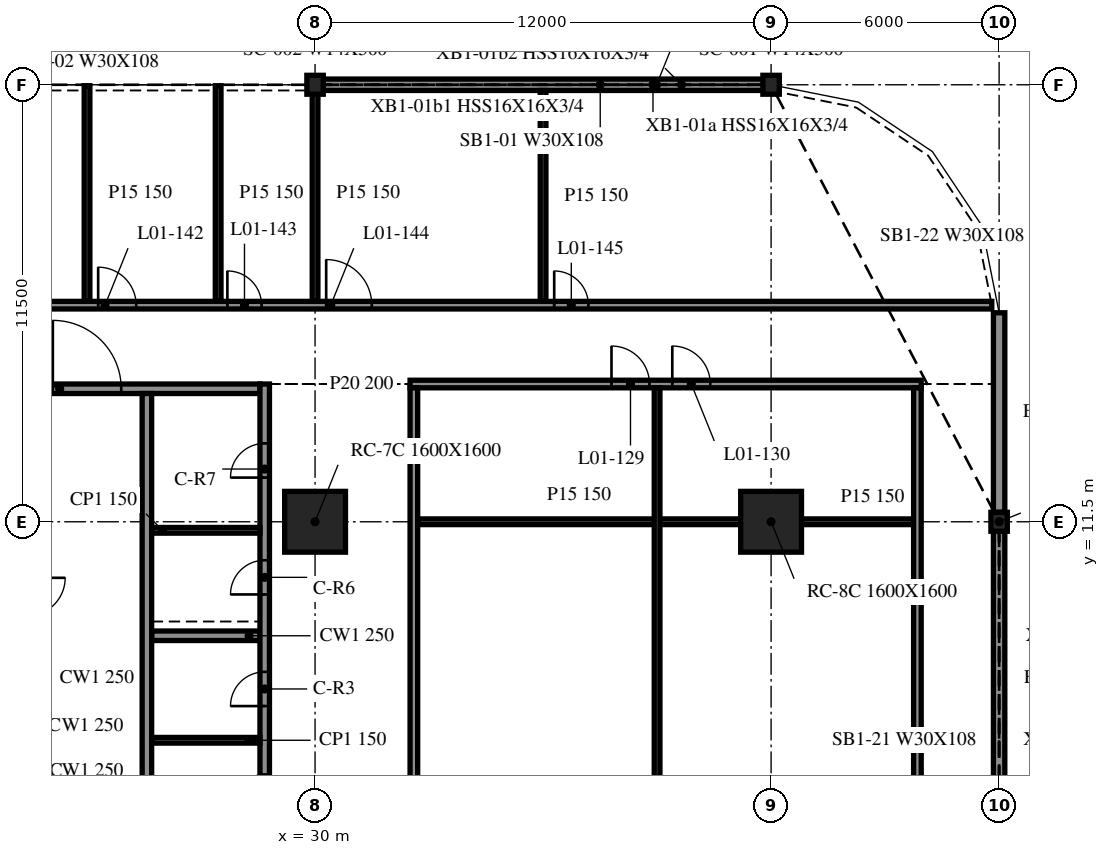
"""IFC4 building model, lengths in metres.
Left out: names, types, materials, properties, quantities, classifications, styles, units other than length and angle.
Written with IfcOpenShell. Run it as: python <this file> out.ifc"""

import sys

from ifc_helpers import new_model, si_unit, direction, frame, frame_2d, origin, origin_2d, place, context, subcontext, project, spatial, rectangle, i_section, extrude, element, fill, save


model = new_model("IFC4")
c1 = context("Model", 3, precision=1e-05, world=origin(), true_north=direction((0.0, 1.0)))
c2 = subcontext(c1, "Body", "Model", "MODEL_VIEW")
j1 = project(units=[si_unit("LENGTHUNIT", "METRE"), si_unit("PLANEANGLEUNIT", "RADIAN")], contexts=[c1])
p1 = place(None, origin())
s1 = spatial("IfcSite", under=j1, at=p1, CompositionType="ELEMENT")
p2 = place(p1, origin())
s2 = spatial("IfcBuilding", under=s1, at=p2, CompositionType="ELEMENT")
p3 = place(p2, frame((0.0, 0.0, 7.2)))
s3 = spatial("IfcBuildingStorey", under=s2, at=p3, CompositionType="ELEMENT", Elevation=7.2)
for number, where, z_axis, x_axis in (
    (1, (30.0, 11.5, -0.34), (0.0, 0.0, 1.0), (1.0, 0.0, 0.0)),
    (2, (42.0, 11.5, -0.34), (0.0, 0.0, 1.0), (1.0, 0.0, 0.0)),
):
    element("IfcColumn", number, at=place(p3, frame(where, z_axis=z_axis, x_axis=x_axis)), inside=s3, PredefinedType="COLUMN", context=c2, shape_type="SweptSolid", body=[
        extrude(rectangle(XDim=1.6, YDim=1.6, at=origin_2d()), origin(), (0.0, 0.0, 1.0), 4.3),
    ])
for number, where, z_axis, x_axis in (
    (3, (42.0, 23.0, -0.34), (0.0, 0.0, 1.0), (1.0, 0.0, 0.0)),
    (4, (30.0, 23.0, -0.34), (0.0, 0.0, 1.0), (1.0, 0.0, 0.0)),
    (5, (48.0, 11.5, -0.34), (0.0, 0.0, 1.0), (1.0, 0.0, 0.0)),
):
    element("IfcColumn", number, at=place(p3, frame(where, z_axis=z_axis, x_axis=x_axis)), inside=s3, PredefinedType="COLUMN", context=c2, shape_type="SweptSolid", body=[
        extrude(i_section(OverallWidth=0.432, OverallDepth=0.498, WebThickness=0.056, FlangeThickness=0.089, at=origin_2d()), origin(), (0.0, 0.0, 1.0), 4.3),
    ])
p4 = place(p3, frame((41.972, 23.0, 0.0), z_axis=(0.0, 0.0, 1.0), x_axis=(-1.0, 0.0, 0.0)))
e6 = element("IfcWall", 6, at=p4, inside=s3, PredefinedType="NOTDEFINED", context=c2, shape_type="SweptSolid", body=[
    extrude(rectangle(XDim=11.944, YDim=0.3, at=frame_2d((5.972, 0.0))), origin(), (0.0, 0.0, 1.0), 3.203),
])
p5 = place(p3, frame((48.0, 0.249, 0.0), z_axis=(0.0, 0.0, 1.0), x_axis=(0.0, 1.0, 0.0)))
e7 = element("IfcWall", 7, at=p5, inside=s3, PredefinedType="NOTDEFINED", context=c2, shape_type="SweptSolid", body=[
    extrude(rectangle(XDim=11.002, YDim=0.3, at=frame_2d((5.501, 0.0))), origin(), (0.0, 0.0, 1.0), 3.203),
])
p6 = place(p3, frame((48.0, 11.749, 0.0), z_axis=(0.0, 0.0, 1.0), x_axis=(0.0, 1.0, 0.0)))
e8 = element("IfcWall", 8, at=p6, inside=s3, PredefinedType="NOTDEFINED", context=c2, shape_type="SweptSolid", body=[
    extrude(rectangle(XDim=5.251, YDim=0.3, at=frame_2d((2.625, 0.0))), origin(), (0.0, 0.0, 1.0), 3.203),
])
p7 = place(p3, frame((28.675, -9.125, 0.0), z_axis=(0.0, 0.0, 1.0), x_axis=(0.0, 1.0, 0.0)))
e9 = element("IfcWall", 9, at=p7, inside=s3, PredefinedType="SOLIDWALL", context=c2, shape_type="SweptSolid", body=[
    extrude(rectangle(XDim=24.25, YDim=0.25, at=frame_2d((12.125, 0.0))), origin(), (0.0, 0.0, 1.0), 3.96),
])
p8 = place(p7, frame((13.075, 0.0, 0.0)))
e10 = element("IfcOpeningElement", 10, at=p8, cuts=e9, PredefinedType="OPENING", context=c2, shape_type="SweptSolid", body=[
    extrude(rectangle(XDim=0.9, YDim=2.1, at=frame_2d((0.45, 1.05))), frame((0.0, 0.135, 0.0), z_axis=(0.0, -1.0, 0.0), x_axis=(1.0, 0.0, 0.0)), (0.0, 0.0, 1.0), 0.27),
])
p9 = place(p7, frame((15.775, 0.0, 0.0)))
e11 = element("IfcOpeningElement", 11, at=p9, cuts=e9, PredefinedType="OPENING", context=c2, shape_type="SweptSolid", body=[
    extrude(rectangle(XDim=0.9, YDim=2.1, at=frame_2d((0.45, 1.05))), frame((0.0, 0.135, 0.0), z_axis=(0.0, -1.0, 0.0), x_axis=(1.0, 0.0, 0.0)), (0.0, 0.0, 1.0), 0.27),
])
p10 = place(p7, frame((18.712, 0.0, 0.0)))
e12 = element("IfcOpeningElement", 12, at=p10, cuts=e9, PredefinedType="OPENING", context=c2, shape_type="SweptSolid", body=[
    extrude(rectangle(XDim=0.9, YDim=2.1, at=frame_2d((0.45, 1.05))), frame((0.0, 0.135, 0.0), z_axis=(0.0, -1.0, 0.0), x_axis=(1.0, 0.0, 0.0)), (0.0, 0.0, 1.0), 0.27),
])
p11 = place(p7, frame((21.788, 0.0, 0.0)))
e13 = element("IfcOpeningElement", 13, at=p11, cuts=e9, PredefinedType="OPENING", context=c2, shape_type="SweptSolid", body=[
    extrude(rectangle(XDim=0.9, YDim=2.1, at=frame_2d((0.45, 1.05))), frame((0.0, 0.135, 0.0), z_axis=(0.0, -1.0, 0.0), x_axis=(1.0, 0.0, 0.0)), (0.0, 0.0, 1.0), 0.27),
])
p12 = place(p3, frame((19.45, 15.0, 0.0), z_axis=(0.0, 0.0, 1.0), x_axis=(1.0, 0.0, 0.0)))
e14 = element("IfcWall", 14, at=p12, inside=s3, PredefinedType="SOLIDWALL", context=c2, shape_type="SweptSolid", body=[
    extrude(rectangle(XDim=9.1, YDim=0.25, at=frame_2d((4.55, 0.0))), origin(), (0.0, 0.0, 1.0), 3.96),
])
p13 = place(p12, frame((3.65, 0.0, 0.0)))
e15 = element("IfcOpeningElement", 15, at=p13, cuts=e14, PredefinedType="OPENING", context=c2, shape_type="SweptSolid", body=[
    extrude(rectangle(XDim=1.8, YDim=2.1, at=frame_2d((0.9, 1.05))), frame((0.0, 0.135, 0.0), z_axis=(0.0, -1.0, 0.0), x_axis=(1.0, 0.0, 0.0)), (0.0, 0.0, 1.0), 0.27),
])
p14 = place(p3, frame((25.575, 14.875, 0.0), z_axis=(0.0, 0.0, 1.0), x_axis=(0.0, -1.0, 0.0)))
e16 = element("IfcWall", 16, at=p14, inside=s3, PredefinedType="SOLIDWALL", context=c2, shape_type="SweptSolid", body=[
    extrude(rectangle(XDim=17.5, YDim=0.25, at=frame_2d((8.75, 0.0))), origin(), (0.0, 0.0, 1.0), 3.96),
])
p15 = place(p14, frame((15.45, 0.0, 0.0)))
e17 = element("IfcOpeningElement", 17, at=p15, cuts=e16, PredefinedType="OPENING", context=c2, shape_type="SweptSolid", body=[
    extrude(rectangle(XDim=1.1, YDim=2.1, at=frame_2d((0.55, 1.05))), frame((0.0, 0.135, 0.0), z_axis=(0.0, -1.0, 0.0), x_axis=(1.0, 0.0, 0.0)), (0.0, 0.0, 1.0), 0.27),
])
p16 = place(p14, frame((12.8, 0.0, 0.0)))
e18 = element("IfcOpeningElement", 18, at=p16, cuts=e16, PredefinedType="OPENING", context=c2, shape_type="SweptSolid", body=[
    extrude(rectangle(XDim=0.9, YDim=2.1, at=frame_2d((0.45, 1.05))), frame((0.0, 0.135, 0.0), z_axis=(0.0, -1.0, 0.0), x_axis=(1.0, 0.0, 0.0)), (0.0, 0.0, 1.0), 0.27),
])
p17 = place(p3, frame((25.7, 8.5, 0.0), z_axis=(0.0, 0.0, 1.0), x_axis=(1.0, 0.0, 0.0)))
e19 = element("IfcWall", 19, at=p17, inside=s3, PredefinedType="SOLIDWALL", context=c2, shape_type="SweptSolid", body=[
    extrude(rectangle(XDim=2.85, YDim=0.25, at=frame_2d((1.425, 0.0))), origin(), (0.0, 0.0, 1.0), 3.96),
])
for number, where, z_axis, x_axis in (
    (20, (25.7, 5.75, 0.0), (0.0, 0.0, 1.0), (1.0, 0.0, 0.0)),
    (21, (25.7, 11.275, 0.0), (0.0, 0.0, 1.0), (1.0, 0.0, 0.0)),
):
    element("IfcWall", number, at=place(p3, frame(where, z_axis=z_axis, x_axis=x_axis)), inside=s3, PredefinedType="PARTITIONING", context=c2, shape_type="SweptSolid", body=[
        extrude(rectangle(XDim=2.85, YDim=0.15, at=frame_2d((1.425, 0.0))), origin(), (0.0, 0.0, 1.0), 3.96),
    ])
p18 = place(p3, frame((32.7, 11.5, 0.0), z_axis=(0.0, 0.0, 1.0), x_axis=(1.0, 0.0, 0.0)))
e22 = element("IfcWall", 22, at=p18, inside=s3, PredefinedType="PARTITIONING", context=c2, shape_type="SweptSolid", body=[
    extrude(rectangle(XDim=8.5, YDim=0.15, at=frame_2d((4.25, 0.0))), origin(), (0.0, 0.0, 1.0), 3.96),
])
p19 = place(p3, frame((42.8, 11.5, 0.0), z_axis=(0.0, 0.0, 1.0), x_axis=(1.0, 0.0, 0.0)))
e23 = element("IfcWall", 23, at=p19, inside=s3, PredefinedType="PARTITIONING", context=c2, shape_type="SweptSolid", body=[
    extrude(rectangle(XDim=2.95, YDim=0.15, at=frame_2d((1.475, 0.0))), origin(), (0.0, 0.0, 1.0), 3.96),
])
p20 = place(p3, frame((32.5, 15.125, 0.0), z_axis=(0.0, 0.0, 1.0), x_axis=(1.0, 0.0, 0.0)))
e24 = element("IfcWall", 24, at=p20, inside=s3, PredefinedType="PARTITIONING", context=c2, shape_type="SweptSolid", body=[
    extrude(rectangle(XDim=13.45, YDim=0.2, at=frame_2d((6.725, 0.0))), origin(), (0.0, 0.0, 1.0), 3.96),
])
p21 = place(p20, frame((5.3, 0.0, 0.0)))
e25 = element("IfcOpeningElement", 25, at=p21, cuts=e24, PredefinedType="OPENING", context=c2, shape_type="SweptSolid", body=[
    extrude(rectangle(XDim=1.0, YDim=2.1, at=frame_2d((0.5, 1.05))), frame((0.0, 0.11, 0.0), z_axis=(0.0, -1.0, 0.0), x_axis=(1.0, 0.0, 0.0)), (0.0, 0.0, 1.0), 0.22),
])
p22 = place(p20, frame((6.9, 0.0, 0.0)))
e26 = element("IfcOpeningElement", 26, at=p22, cuts=e24, PredefinedType="OPENING", context=c2, shape_type="SweptSolid", body=[
    extrude(rectangle(XDim=1.0, YDim=2.1, at=frame_2d((0.5, 1.05))), frame((0.0, 0.11, 0.0), z_axis=(0.0, -1.0, 0.0), x_axis=(1.0, 0.0, 0.0)), (0.0, 0.0, 1.0), 0.22),
])
p23 = place(p3, frame((-47.807, 17.2, 0.0), z_axis=(0.0, 0.0, 1.0), x_axis=(1.0, 0.0, 0.0)))
e27 = element("IfcWall", 27, at=p23, inside=s3, PredefinedType="PARTITIONING", context=c2, shape_type="SweptSolid", body=[
    extrude(rectangle(XDim=95.615, YDim=0.2, at=frame_2d((47.807, 0.0))), origin(), (0.0, 0.0, 1.0), 3.96),
])
p24 = place(p23, frame((4.5, 0.0, 0.0)))
e28 = element("IfcOpeningElement", 28, at=p24, cuts=e27, PredefinedType="OPENING", context=c2, shape_type="SweptSolid", body=[
    extrude(rectangle(XDim=1.0, YDim=2.1, at=frame_2d((0.5, 1.05))), frame((0.0, 0.11, 0.0), z_axis=(0.0, -1.0, 0.0), x_axis=(1.0, 0.0, 0.0)), (0.0, 0.0, 1.0), 0.22),
])
p25 = place(p23, frame((10.9, 0.0, 0.0)))
e29 = element("IfcOpeningElement", 29, at=p25, cuts=e27, PredefinedType="OPENING", context=c2, shape_type="SweptSolid", body=[
    extrude(rectangle(XDim=1.0, YDim=2.1, at=frame_2d((0.5, 1.05))), frame((0.0, 0.11, 0.0), z_axis=(0.0, -1.0, 0.0), x_axis=(1.0, 0.0, 0.0)), (0.0, 0.0, 1.0), 0.22),
])
p26 = place(p23, frame((22.7, 0.0, 0.0)))
e30 = element("IfcOpeningElement", 30, at=p26, cuts=e27, PredefinedType="OPENING", context=c2, shape_type="SweptSolid", body=[
    extrude(rectangle(XDim=0.9, YDim=2.1, at=frame_2d((0.45, 1.05))), frame((0.0, 0.11, 0.0), z_axis=(0.0, -1.0, 0.0), x_axis=(1.0, 0.0, 0.0)), (0.0, 0.0, 1.0), 0.22),
])
p27 = place(p23, frame((25.7, 0.0, 0.0)))
e31 = element("IfcOpeningElement", 31, at=p27, cuts=e27, PredefinedType="OPENING", context=c2, shape_type="SweptSolid", body=[
    extrude(rectangle(XDim=1.2, YDim=2.1, at=frame_2d((0.6, 1.05))), frame((0.0, 0.11, 0.0), z_axis=(0.0, -1.0, 0.0), x_axis=(1.0, 0.0, 0.0)), (0.0, 0.0, 1.0), 0.22),
])
p28 = place(p23, frame((28.7, 0.0, 0.0)))
e32 = element("IfcOpeningElement", 32, at=p28, cuts=e27, PredefinedType="OPENING", context=c2, shape_type="SweptSolid", body=[
    extrude(rectangle(XDim=0.9, YDim=2.1, at=frame_2d((0.45, 1.05))), frame((0.0, 0.11, 0.0), z_axis=(0.0, -1.0, 0.0), x_axis=(1.0, 0.0, 0.0)), (0.0, 0.0, 1.0), 0.22),
])
p29 = place(p23, frame((34.5, 0.0, 0.0)))
e33 = element("IfcOpeningElement", 33, at=p29, cuts=e27, PredefinedType="OPENING", context=c2, shape_type="SweptSolid", body=[
    extrude(rectangle(XDim=1.0, YDim=2.1, at=frame_2d((0.5, 1.05))), frame((0.0, 0.11, 0.0), z_axis=(0.0, -1.0, 0.0), x_axis=(1.0, 0.0, 0.0)), (0.0, 0.0, 1.0), 0.22),
])
p30 = place(p23, frame((46.5, 0.0, 0.0)))
e34 = element("IfcOpeningElement", 34, at=p30, cuts=e27, PredefinedType="OPENING", context=c2, shape_type="SweptSolid", body=[
    extrude(rectangle(XDim=1.0, YDim=2.1, at=frame_2d((0.5, 1.05))), frame((0.0, 0.11, 0.0), z_axis=(0.0, -1.0, 0.0), x_axis=(1.0, 0.0, 0.0)), (0.0, 0.0, 1.0), 0.22),
])
p31 = place(p23, frame((48.1, 0.0, 0.0)))
e35 = element("IfcOpeningElement", 35, at=p31, cuts=e27, PredefinedType="OPENING", context=c2, shape_type="SweptSolid", body=[
    extrude(rectangle(XDim=0.9, YDim=2.1, at=frame_2d((0.45, 1.05))), frame((0.0, 0.11, 0.0), z_axis=(0.0, -1.0, 0.0), x_axis=(1.0, 0.0, 0.0)), (0.0, 0.0, 1.0), 0.22),
])
p32 = place(p23, frame((51.5, 0.0, 0.0)))
e36 = element("IfcOpeningElement", 36, at=p32, cuts=e27, PredefinedType="OPENING", context=c2, shape_type="SweptSolid", body=[
    extrude(rectangle(XDim=1.2, YDim=2.1, at=frame_2d((0.6, 1.05))), frame((0.0, 0.11, 0.0), z_axis=(0.0, -1.0, 0.0), x_axis=(1.0, 0.0, 0.0)), (0.0, 0.0, 1.0), 0.22),
])
p33 = place(p23, frame((54.1, 0.0, 0.0)))
e37 = element("IfcOpeningElement", 37, at=p33, cuts=e27, PredefinedType="OPENING", context=c2, shape_type="SweptSolid", body=[
    extrude(rectangle(XDim=0.9, YDim=2.1, at=frame_2d((0.45, 1.05))), frame((0.0, 0.11, 0.0), z_axis=(0.0, -1.0, 0.0), x_axis=(1.0, 0.0, 0.0)), (0.0, 0.0, 1.0), 0.22),
])
p34 = place(p23, frame((60.1, 0.0, 0.0)))
e38 = element("IfcOpeningElement", 38, at=p34, cuts=e27, PredefinedType="OPENING", context=c2, shape_type="SweptSolid", body=[
    extrude(rectangle(XDim=1.0, YDim=2.1, at=frame_2d((0.5, 1.05))), frame((0.0, 0.11, 0.0), z_axis=(0.0, -1.0, 0.0), x_axis=(1.0, 0.0, 0.0)), (0.0, 0.0, 1.0), 0.22),
])
p35 = place(p23, frame((72.1, 0.0, 0.0)))
e39 = element("IfcOpeningElement", 39, at=p35, cuts=e27, PredefinedType="OPENING", context=c2, shape_type="SweptSolid", body=[
    extrude(rectangle(XDim=1.0, YDim=2.1, at=frame_2d((0.5, 1.05))), frame((0.0, 0.11, 0.0), z_axis=(0.0, -1.0, 0.0), x_axis=(1.0, 0.0, 0.0)), (0.0, 0.0, 1.0), 0.22),
])
p36 = place(p23, frame((75.5, 0.0, 0.0)))
e40 = element("IfcOpeningElement", 40, at=p36, cuts=e27, PredefinedType="OPENING", context=c2, shape_type="SweptSolid", body=[
    extrude(rectangle(XDim=0.9, YDim=2.1, at=frame_2d((0.45, 1.05))), frame((0.0, 0.11, 0.0), z_axis=(0.0, -1.0, 0.0), x_axis=(1.0, 0.0, 0.0)), (0.0, 0.0, 1.0), 0.22),
])
p37 = place(p23, frame((78.1, 0.0, 0.0)))
e41 = element("IfcOpeningElement", 41, at=p37, cuts=e27, PredefinedType="OPENING", context=c2, shape_type="SweptSolid", body=[
    extrude(rectangle(XDim=1.2, YDim=2.1, at=frame_2d((0.6, 1.05))), frame((0.0, 0.11, 0.0), z_axis=(0.0, -1.0, 0.0), x_axis=(1.0, 0.0, 0.0)), (0.0, 0.0, 1.0), 0.22),
])
p38 = place(p23, frame((84.1, 0.0, 0.0)))
e42 = element("IfcOpeningElement", 42, at=p38, cuts=e27, PredefinedType="OPENING", context=c2, shape_type="SweptSolid", body=[
    extrude(rectangle(XDim=0.9, YDim=2.1, at=frame_2d((0.45, 1.05))), frame((0.0, 0.11, 0.0), z_axis=(0.0, -1.0, 0.0), x_axis=(1.0, 0.0, 0.0)), (0.0, 0.0, 1.0), 0.22),
])
for number, where, z_axis, x_axis in (
    (43, (24.0, 17.3, 0.0), (0.0, 0.0, 1.0), (0.0, 1.0, 0.0)),
    (44, (27.45, 17.3, 0.0), (0.0, 0.0, 1.0), (0.0, 1.0, 0.0)),
    (45, (30.0, 17.3, 0.0), (0.0, 0.0, 1.0), (0.0, 1.0, 0.0)),
):
    element("IfcWall", number, at=place(p3, frame(where, z_axis=z_axis, x_axis=x_axis)), inside=s3, PredefinedType="PARTITIONING", context=c2, shape_type="SweptSolid", body=[
        extrude(rectangle(XDim=5.675, YDim=0.15, at=frame_2d((2.837, 0.0))), origin(), (0.0, 0.0, 1.0), 3.96),
    ])
p39 = place(p3, frame((32.6, -9.025, 0.0), z_axis=(0.0, 0.0, 1.0), x_axis=(0.0, 1.0, 0.0)))
e46 = element("IfcWall", 46, at=p39, inside=s3, PredefinedType="PARTITIONING", context=c2, shape_type="SweptSolid", body=[
    extrude(rectangle(XDim=24.05, YDim=0.2, at=frame_2d((12.025, 0.0))), origin(), (0.0, 0.0, 1.0), 3.96),
])
p40 = place(p39, frame((11.5, 0.0, 0.0)))
e47 = element("IfcOpeningElement", 47, at=p40, cuts=e46, PredefinedType="OPENING", context=c2, shape_type="SweptSolid", body=[
    extrude(rectangle(XDim=1.2, YDim=2.1, at=frame_2d((0.6, 1.05))), frame((0.0, 0.11, 0.0), z_axis=(0.0, -1.0, 0.0), x_axis=(1.0, 0.0, 0.0)), (0.0, 0.0, 1.0), 0.22),
])
p41 = place(p3, frame((36.0, 17.3, 0.0), z_axis=(0.0, 0.0, 1.0), x_axis=(0.0, 1.0, 0.0)))
e48 = element("IfcWall", 48, at=p41, inside=s3, PredefinedType="PARTITIONING", context=c2, shape_type="SweptSolid", body=[
    extrude(rectangle(XDim=5.55, YDim=0.15, at=frame_2d((2.775, 0.0))), origin(), (0.0, 0.0, 1.0), 3.96),
])
p42 = place(p3, frame((39.0, -9.025, 0.0), z_axis=(0.0, 0.0, 1.0), x_axis=(0.0, 1.0, 0.0)))
e49 = element("IfcWall", 49, at=p42, inside=s3, PredefinedType="PARTITIONING", context=c2, shape_type="SweptSolid", body=[
    extrude(rectangle(XDim=24.05, YDim=0.15, at=frame_2d((12.025, 0.0))), origin(), (0.0, 0.0, 1.0), 3.96),
])
p43 = place(p3, frame((45.85, -9.025, 0.0), z_axis=(0.0, 0.0, 1.0), x_axis=(0.0, 1.0, 0.0)))
e50 = element("IfcWall", 50, at=p43, inside=s3, PredefinedType="PARTITIONING", context=c2, shape_type="SweptSolid", body=[
    extrude(rectangle(XDim=24.05, YDim=0.2, at=frame_2d((12.025, 0.0))), origin(), (0.0, 0.0, 1.0), 3.96),
])
p44 = place(p43, frame((11.5, 0.0, 0.0)))
e51 = element("IfcOpeningElement", 51, at=p44, cuts=e50, PredefinedType="OPENING", context=c2, shape_type="SweptSolid", body=[
    extrude(rectangle(XDim=1.2, YDim=2.1, at=frame_2d((0.6, 1.05))), frame((0.0, 0.11, 0.0), z_axis=(0.0, -1.0, 0.0), x_axis=(1.0, 0.0, 0.0)), (0.0, 0.0, 1.0), 0.22),
])
p45 = place(p13, origin())
e52 = element("IfcDoor", 52, at=p45, inside=s3, OperationType="DOUBLE_DOOR_SINGLE_SWING", PredefinedType="DOOR", context=c2, shape_type="SweptSolid", body=[
    extrude(rectangle(XDim=1.8, YDim=2.1, at=frame_2d((0.9, 1.05))), frame((0.0, 0.025, 0.0), z_axis=(0.0, -1.0, 0.0), x_axis=(1.0, 0.0, 0.0)), (0.0, 0.0, 1.0), 0.05),
])
fill(e15, e52)
p46 = place(p8, origin())
e53 = element("IfcDoor", 53, at=p46, inside=s3, OperationType="SINGLE_SWING_RIGHT", PredefinedType="DOOR", context=c2, shape_type="SweptSolid", body=[
    extrude(rectangle(XDim=0.9, YDim=2.1, at=frame_2d((0.45, 1.05))), frame((0.0, 0.025, 0.0), z_axis=(0.0, -1.0, 0.0), x_axis=(1.0, 0.0, 0.0)), (0.0, 0.0, 1.0), 0.05),
])
fill(e10, e53)
p47 = place(p9, origin())
e54 = element("IfcDoor", 54, at=p47, inside=s3, OperationType="SINGLE_SWING_LEFT", PredefinedType="DOOR", context=c2, shape_type="SweptSolid", body=[
    extrude(rectangle(XDim=0.9, YDim=2.1, at=frame_2d((0.45, 1.05))), frame((0.0, 0.025, 0.0), z_axis=(0.0, -1.0, 0.0), x_axis=(1.0, 0.0, 0.0)), (0.0, 0.0, 1.0), 0.05),
])
fill(e11, e54)
p48 = place(p10, origin())
e55 = element("IfcDoor", 55, at=p48, inside=s3, OperationType="SINGLE_SWING_RIGHT", PredefinedType="DOOR", context=c2, shape_type="SweptSolid", body=[
    extrude(rectangle(XDim=0.9, YDim=2.1, at=frame_2d((0.45, 1.05))), frame((0.0, 0.025, 0.0), z_axis=(0.0, -1.0, 0.0), x_axis=(1.0, 0.0, 0.0)), (0.0, 0.0, 1.0), 0.05),
])
fill(e12, e55)
p49 = place(p11, origin())
e56 = element("IfcDoor", 56, at=p49, inside=s3, OperationType="SINGLE_SWING_LEFT", PredefinedType="DOOR", context=c2, shape_type="SweptSolid", body=[
    extrude(rectangle(XDim=0.9, YDim=2.1, at=frame_2d((0.45, 1.05))), frame((0.0, 0.025, 0.0), z_axis=(0.0, -1.0, 0.0), x_axis=(1.0, 0.0, 0.0)), (0.0, 0.0, 1.0), 0.05),
])
fill(e13, e56)
p50 = place(p21, origin())
e57 = element("IfcDoor", 57, at=p50, inside=s3, OperationType="SINGLE_SWING_RIGHT", PredefinedType="DOOR", context=c2, shape_type="SweptSolid", body=[
    extrude(rectangle(XDim=1.0, YDim=2.1, at=frame_2d((0.5, 1.05))), frame((0.0, 0.025, 0.0), z_axis=(0.0, -1.0, 0.0), x_axis=(1.0, 0.0, 0.0)), (0.0, 0.0, 1.0), 0.05),
])
fill(e25, e57)
p51 = place(p22, origin())
e58 = element("IfcDoor", 58, at=p51, inside=s3, OperationType="SINGLE_SWING_LEFT", PredefinedType="DOOR", context=c2, shape_type="SweptSolid", body=[
    extrude(rectangle(XDim=1.0, YDim=2.1, at=frame_2d((0.5, 1.05))), frame((0.0, 0.025, 0.0), z_axis=(0.0, -1.0, 0.0), x_axis=(1.0, 0.0, 0.0)), (0.0, 0.0, 1.0), 0.05),
])
fill(e26, e58)
p52 = place(p35, origin())
e59 = element("IfcDoor", 59, at=p52, inside=s3, OperationType="SINGLE_SWING_RIGHT", PredefinedType="DOOR", context=c2, shape_type="SweptSolid", body=[
    extrude(rectangle(XDim=1.0, YDim=2.1, at=frame_2d((0.5, 1.05))), frame((0.0, 0.025, 0.0), z_axis=(0.0, -1.0, 0.0), x_axis=(1.0, 0.0, 0.0)), (0.0, 0.0, 1.0), 0.05),
])
fill(e39, e59)
p53 = place(p36, origin())
e60 = element("IfcDoor", 60, at=p53, inside=s3, OperationType="SINGLE_SWING_RIGHT", PredefinedType="DOOR", context=c2, shape_type="SweptSolid", body=[
    extrude(rectangle(XDim=0.9, YDim=2.1, at=frame_2d((0.45, 1.05))), frame((0.0, 0.025, 0.0), z_axis=(0.0, -1.0, 0.0), x_axis=(1.0, 0.0, 0.0)), (0.0, 0.0, 1.0), 0.05),
])
fill(e40, e60)
p54 = place(p37, origin())
e61 = element("IfcDoor", 61, at=p54, inside=s3, OperationType="SINGLE_SWING_RIGHT", PredefinedType="DOOR", context=c2, shape_type="SweptSolid", body=[
    extrude(rectangle(XDim=1.2, YDim=2.1, at=frame_2d((0.6, 1.05))), frame((0.0, 0.025, 0.0), z_axis=(0.0, -1.0, 0.0), x_axis=(1.0, 0.0, 0.0)), (0.0, 0.0, 1.0), 0.05),
])
fill(e41, e61)
p55 = place(p38, origin())
e62 = element("IfcDoor", 62, at=p55, inside=s3, OperationType="SINGLE_SWING_RIGHT", PredefinedType="DOOR", context=c2, shape_type="SweptSolid", body=[
    extrude(rectangle(XDim=0.9, YDim=2.1, at=frame_2d((0.45, 1.05))), frame((0.0, 0.025, 0.0), z_axis=(0.0, -1.0, 0.0), x_axis=(1.0, 0.0, 0.0)), (0.0, 0.0, 1.0), 0.05),
])
fill(e42, e62)
save(model, sys.argv[1])
